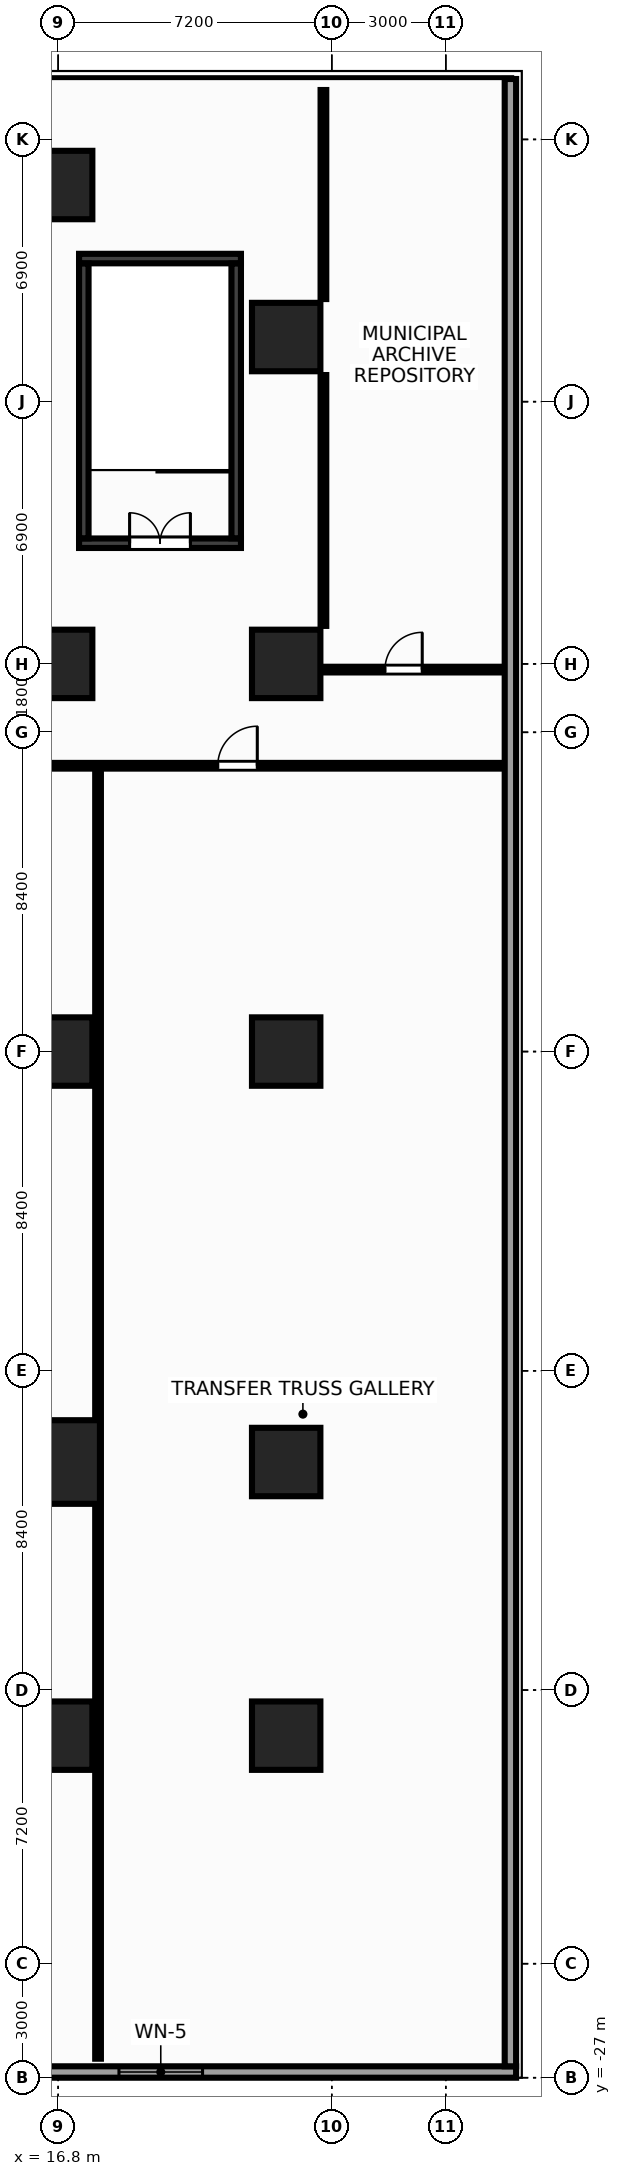
"""IFC4 building model, lengths in metres.
Left out: names, types, materials, properties, quantities, classifications, styles, units other than length and angle.
Written with IfcOpenShell. Run it as: python <this file> out.ifc"""

import sys

from ifc_helpers import new_model, si_unit, direction, frame, frame_2d, origin, origin_2d, place, context, subcontext, project, spatial, rectangle, extrude, source, transform, mapped, element, fill, save


model = new_model("IFC4")
c1 = context("Model", 3, precision=1e-05, world=origin(), true_north=direction((0.0, 1.0)))
c2 = subcontext(c1, "Body", "Model", "MODEL_VIEW")
j1 = project(units=[si_unit("LENGTHUNIT", "METRE"), si_unit("PLANEANGLEUNIT", "RADIAN")], contexts=[c1])
p1 = place(None, origin())
s1 = spatial("IfcSite", under=j1, at=p1, CompositionType="ELEMENT")
p2 = place(p1, origin())
s2 = spatial("IfcBuilding", under=s1, at=p2, CompositionType="ELEMENT")
p3 = place(p2, frame((0.0, 0.0, 18.95)))
s3 = spatial("IfcBuildingStorey", under=s2, at=p3, CompositionType="ELEMENT", Elevation=18.95)
m1 = source(origin(), c2, "Body", "SweptSolid", [
    extrude(rectangle(XDim=4.26, YDim=0.25, at=frame_2d((2.13, 0.0))), origin(), (0.0, 0.0, 1.0), 4.65),
])
p4 = place(p3, frame((17.35, 20.865, 0.0), z_axis=(0.0, 0.0, 1.0), x_axis=(1.0, 0.0, 0.0)))
e1 = element("IfcWall", 1, at=p4, inside=s3, PredefinedType="SHEAR", context=c2, shape_type="MappedRepresentation", body=[
    mapped(m1, transform((0.0, 0.0, 0.0), x_axis=(1.0, 0.0, 0.0), y_axis=(0.0, 1.0, 0.0), z_axis=(0.0, 0.0, 1.0), scale=1.0)),
])
p5 = place(p3, frame((17.35, 13.375, 0.0), z_axis=(0.0, 0.0, 1.0), x_axis=(1.0, 0.0, 0.0)))
e2 = element("IfcWall", 2, at=p5, inside=s3, PredefinedType="SHEAR", context=c2, shape_type="MappedRepresentation", body=[
    mapped(m1, transform((0.0, 0.0, 0.0), x_axis=(1.0, 0.0, 0.0), y_axis=(0.0, 1.0, 0.0), z_axis=(0.0, 0.0, 1.0), scale=1.0)),
])
p6 = place(p5, frame((1.33, 0.0, 0.0)))
e3 = element("IfcOpeningElement", 3, at=p6, cuts=e2, PredefinedType="OPENING", context=c2, shape_type="SweptSolid", body=[
    extrude(rectangle(XDim=1.6, YDim=2.15, at=frame_2d((0.8, 1.075))), frame((0.0, 0.137, 0.0), z_axis=(0.0, -1.0, 0.0), x_axis=(1.0, 0.0, 0.0)), (0.0, 0.0, 1.0), 0.274),
])
m2 = source(origin(), c2, "Body", "SweptSolid", [
    extrude(rectangle(XDim=7.23, YDim=0.25, at=frame_2d((3.615, 0.0))), origin(), (0.0, 0.0, 1.0), 4.65),
])
for number, where, z_axis, x_axis in (
    (4, (17.475, 13.505, 0.0), (0.0, 0.0, 1.0), (0.0, 1.0, 0.0)),
    (5, (21.485, 13.505, 0.0), (0.0, 0.0, 1.0), (0.0, 1.0, 0.0)),
):
    element("IfcWall", number, at=place(p3, frame(where, z_axis=z_axis, x_axis=x_axis)), inside=s3, PredefinedType="SHEAR", context=c2, shape_type="MappedRepresentation", body=[
        mapped(m2, transform((0.0, 0.0, 0.0), x_axis=(1.0, 0.0, 0.0), y_axis=(0.0, 1.0, 0.0), z_axis=(0.0, 0.0, 1.0), scale=1.0)),
    ])
m3 = source(origin(), c2, "Body", "SweptSolid", [
    extrude(rectangle(XDim=1.8, YDim=1.8, at=origin_2d()), origin(), (0.0, 0.0, 1.0), 4.65),
])
p7 = place(p3, frame((16.8, -18.0, 0.0), z_axis=(0.0, 0.0, 1.0), x_axis=(1.0, 0.0, 0.0)))
e6 = element("IfcColumn", 6, at=p7, inside=s3, PredefinedType="COLUMN", context=c2, shape_type="MappedRepresentation", body=[
    mapped(m3, transform((0.0, 0.0, 0.0), x_axis=(1.0, 0.0, 0.0), y_axis=(0.0, 1.0, 0.0), z_axis=(0.0, 0.0, 1.0), scale=1.0)),
])
m4 = source(origin(), c2, "Body", "SweptSolid", [
    extrude(rectangle(XDim=2.2, YDim=2.2, at=origin_2d()), origin(), (0.0, 0.0, 1.0), 4.65),
])
p8 = place(p3, frame((16.8, -10.8, 0.0), z_axis=(0.0, 0.0, 1.0), x_axis=(1.0, 0.0, 0.0)))
e7 = element("IfcColumn", 7, at=p8, inside=s3, PredefinedType="COLUMN", context=c2, shape_type="MappedRepresentation", body=[
    mapped(m4, transform((0.0, 0.0, 0.0), x_axis=(1.0, 0.0, 0.0), y_axis=(0.0, 1.0, 0.0), z_axis=(0.0, 0.0, 1.0), scale=1.0)),
])
for number, where, z_axis, x_axis in (
    (8, (16.8, 0.0, 0.0), (0.0, 0.0, 1.0), (1.0, 0.0, 0.0)),
    (9, (16.8, 10.2, 0.0), (0.0, 0.0, 1.0), (1.0, 0.0, 0.0)),
    (10, (16.8, 22.8, 0.0), (0.0, 0.0, 1.0), (1.0, 0.0, 0.0)),
    (11, (22.8, -18.0, 0.0), (0.0, 0.0, 1.0), (1.0, 0.0, 0.0)),
    (12, (22.8, -10.8, 0.0), (0.0, 0.0, 1.0), (1.0, 0.0, 0.0)),
    (13, (22.8, 0.0, 0.0), (0.0, 0.0, 1.0), (1.0, 0.0, 0.0)),
    (14, (22.8, 10.2, 0.0), (0.0, 0.0, 1.0), (1.0, 0.0, 0.0)),
    (15, (22.8, 18.8, 0.0), (0.0, 0.0, 1.0), (1.0, 0.0, 0.0)),
):
    element("IfcColumn", number, at=place(p3, frame(where, z_axis=z_axis, x_axis=x_axis)), inside=s3, PredefinedType="COLUMN", context=c2, shape_type="MappedRepresentation", body=[
        mapped(m3, transform((0.0, 0.0, 0.0), x_axis=(1.0, 0.0, 0.0), y_axis=(0.0, 1.0, 0.0), z_axis=(0.0, 0.0, 1.0), scale=1.0)),
    ])
m5 = source(origin(), c2, "Body", "SweptSolid", [
    extrude(rectangle(XDim=57.7, YDim=0.3, at=frame_2d((28.85, 0.0))), origin(), (0.0, 0.0, 1.0), 3.91),
])
p9 = place(p3, frame((28.85, -26.85, 0.0), z_axis=(0.0, 0.0, 1.0), x_axis=(-1.0, 0.0, 0.0)))
e16 = element("IfcWall", 16, at=p9, inside=s3, PredefinedType="STANDARD", context=c2, shape_type="MappedRepresentation", body=[
    mapped(m5, transform((0.0, 0.0, 0.0), x_axis=(1.0, 0.0, 0.0), y_axis=(0.0, 1.0, 0.0), z_axis=(0.0, 0.0, 1.0), scale=1.0)),
])
p10 = place(p9, frame((8.25, 0.0, 0.9)))
e17 = element("IfcOpeningElement", 17, at=p10, cuts=e16, PredefinedType="OPENING", context=c2, shape_type="SweptSolid", body=[
    extrude(rectangle(XDim=2.2, YDim=2.5, at=frame_2d((1.1, 1.25))), frame((0.0, 0.162, 0.0), z_axis=(0.0, -1.0, 0.0), x_axis=(1.0, 0.0, 0.0)), (0.0, 0.0, 1.0), 0.324),
])
p11 = place(p9, frame((14.75, 0.0, 0.9)))
e18 = element("IfcOpeningElement", 18, at=p11, cuts=e16, PredefinedType="OPENING", context=c2, shape_type="SweptSolid", body=[
    extrude(rectangle(XDim=2.2, YDim=2.5, at=frame_2d((1.1, 1.25))), frame((0.0, 0.162, 0.0), z_axis=(0.0, -1.0, 0.0), x_axis=(1.0, 0.0, 0.0)), (0.0, 0.0, 1.0), 0.324),
])
p12 = place(p9, frame((40.75, 0.0, 0.9)))
e19 = element("IfcOpeningElement", 19, at=p12, cuts=e16, PredefinedType="OPENING", context=c2, shape_type="SweptSolid", body=[
    extrude(rectangle(XDim=2.2, YDim=2.5, at=frame_2d((1.1, 1.25))), frame((0.0, 0.162, 0.0), z_axis=(0.0, -1.0, 0.0), x_axis=(1.0, 0.0, 0.0)), (0.0, 0.0, 1.0), 0.324),
])
p13 = place(p9, frame((47.25, 0.0, 0.9)))
e20 = element("IfcOpeningElement", 20, at=p13, cuts=e16, PredefinedType="OPENING", context=c2, shape_type="SweptSolid", body=[
    extrude(rectangle(XDim=2.2, YDim=2.5, at=frame_2d((1.1, 1.25))), frame((0.0, 0.162, 0.0), z_axis=(0.0, -1.0, 0.0), x_axis=(1.0, 0.0, 0.0)), (0.0, 0.0, 1.0), 0.324),
])
m6 = source(origin(), c2, "Body", "SweptSolid", [
    extrude(rectangle(XDim=52.29, YDim=0.3, at=frame_2d((26.145, 0.0))), origin(), (0.0, 0.0, 1.0), 3.91),
])
p14 = place(p3, frame((28.7, 25.59, 0.0), z_axis=(0.0, 0.0, 1.0), x_axis=(0.0, -1.0, 0.0)))
e21 = element("IfcWall", 21, at=p14, inside=s3, PredefinedType="STANDARD", context=c2, shape_type="MappedRepresentation", body=[
    mapped(m6, transform((0.0, 0.0, 0.0), x_axis=(1.0, 0.0, 0.0), y_axis=(0.0, 1.0, 0.0), z_axis=(0.0, 0.0, 1.0), scale=1.0)),
])
m7 = source(origin(), c2, "Body", "SweptSolid", [
    extrude(rectangle(XDim=57.0, YDim=0.15, at=frame_2d((28.5, 0.0))), origin(), (0.0, 0.0, 1.0), 3.795),
])
p15 = place(p3, frame((-28.5, 7.52, 0.0), z_axis=(0.0, 0.0, 1.0), x_axis=(1.0, 0.0, 0.0)))
e22 = element("IfcWall", 22, at=p15, inside=s3, PredefinedType="PARTITIONING", context=c2, shape_type="MappedRepresentation", body=[
    mapped(m7, transform((0.0, 0.0, 0.0), x_axis=(1.0, 0.0, 0.0), y_axis=(0.0, 1.0, 0.0), z_axis=(0.0, 0.0, 1.0), scale=1.0)),
])
p16 = place(p15, frame((6.0, 0.0, 0.0)))
e23 = element("IfcOpeningElement", 23, at=p16, cuts=e22, PredefinedType="OPENING", context=c2, shape_type="SweptSolid", body=[
    extrude(rectangle(XDim=1.04, YDim=2.2, at=frame_2d((0.52, 1.1))), frame((0.0, 0.087, 0.0), z_axis=(0.0, -1.0, 0.0), x_axis=(1.0, 0.0, 0.0)), (0.0, 0.0, 1.0), 0.174),
])
p17 = place(p15, frame((27.7, 0.0, 0.0)))
e24 = element("IfcOpeningElement", 24, at=p17, cuts=e22, PredefinedType="OPENING", context=c2, shape_type="SweptSolid", body=[
    extrude(rectangle(XDim=1.65, YDim=2.35, at=frame_2d((0.825, 1.175))), frame((0.0, 0.087, 0.0), z_axis=(0.0, -1.0, 0.0), x_axis=(1.0, 0.0, 0.0)), (0.0, 0.0, 1.0), 0.174),
])
p18 = place(p15, frame((49.5, 0.0, 0.0)))
e25 = element("IfcOpeningElement", 25, at=p18, cuts=e22, PredefinedType="OPENING", context=c2, shape_type="SweptSolid", body=[
    extrude(rectangle(XDim=1.04, YDim=2.2, at=frame_2d((0.52, 1.1))), frame((0.0, 0.087, 0.0), z_axis=(0.0, -1.0, 0.0), x_axis=(1.0, 0.0, 0.0)), (0.0, 0.0, 1.0), 0.174),
])
m8 = source(origin(), c2, "Body", "SweptSolid", [
    extrude(rectangle(XDim=4.7, YDim=0.15, at=frame_2d((2.35, 0.0))), origin(), (0.0, 0.0, 1.0), 3.485),
])
p19 = place(p3, frame((23.8, 10.05, 0.0), z_axis=(0.0, 0.0, 1.0), x_axis=(1.0, 0.0, 0.0)))
e26 = element("IfcWall", 26, at=p19, inside=s3, PredefinedType="PARTITIONING", context=c2, shape_type="MappedRepresentation", body=[
    mapped(m8, transform((0.0, 0.0, 0.0), x_axis=(1.0, 0.0, 0.0), y_axis=(0.0, 1.0, 0.0), z_axis=(0.0, 0.0, 1.0), scale=1.0)),
])
p20 = place(p19, frame((1.6, 0.0, 0.0)))
e27 = element("IfcOpeningElement", 27, at=p20, cuts=e26, PredefinedType="OPENING", context=c2, shape_type="SweptSolid", body=[
    extrude(rectangle(XDim=0.98, YDim=2.15, at=frame_2d((0.49, 1.075))), frame((0.0, 0.087, 0.0), z_axis=(0.0, -1.0, 0.0), x_axis=(1.0, 0.0, 0.0)), (0.0, 0.0, 1.0), 0.174),
])
m9 = source(origin(), c2, "Body", "SweptSolid", [
    extrude(rectangle(XDim=6.6, YDim=0.15, at=frame_2d((3.3, 0.0))), origin(), (0.0, 0.0, 1.0), 4.41),
])
p21 = place(p3, frame((23.78, 11.2, 0.0), z_axis=(0.0, 0.0, 1.0), x_axis=(0.0, 1.0, 0.0)))
e28 = element("IfcWall", 28, at=p21, inside=s3, PredefinedType="PARTITIONING", context=c2, shape_type="MappedRepresentation", body=[
    mapped(m9, transform((0.0, 0.0, 0.0), x_axis=(1.0, 0.0, 0.0), y_axis=(0.0, 1.0, 0.0), z_axis=(0.0, 0.0, 1.0), scale=1.0)),
])
m10 = source(origin(), c2, "Body", "SweptSolid", [
    extrude(rectangle(XDim=5.5, YDim=0.15, at=frame_2d((2.75, 0.0))), origin(), (0.0, 0.0, 1.0), 4.41),
])
p22 = place(p3, frame((23.78, 19.8, 0.0), z_axis=(0.0, 0.0, 1.0), x_axis=(0.0, 1.0, 0.0)))
e29 = element("IfcWall", 29, at=p22, inside=s3, PredefinedType="PARTITIONING", context=c2, shape_type="MappedRepresentation", body=[
    mapped(m10, transform((0.0, 0.0, 0.0), x_axis=(1.0, 0.0, 0.0), y_axis=(0.0, 1.0, 0.0), z_axis=(0.0, 0.0, 1.0), scale=1.0)),
])
m11 = source(origin(), c2, "Body", "SweptSolid", [
    extrude(rectangle(XDim=33.88, YDim=0.15, at=frame_2d((16.94, 0.0))), origin(), (0.0, 0.0, 1.0), 3.795),
])
p23 = place(p3, frame((17.85, -26.5, 0.0), z_axis=(0.0, 0.0, 1.0), x_axis=(0.0, 1.0, 0.0)))
e30 = element("IfcWall", 30, at=p23, inside=s3, PredefinedType="PARTITIONING", context=c2, shape_type="MappedRepresentation", body=[
    mapped(m11, transform((0.0, 0.0, 0.0), x_axis=(1.0, 0.0, 0.0), y_axis=(0.0, 1.0, 0.0), z_axis=(0.0, 0.0, 1.0), scale=1.0)),
])
m12 = source(origin(), c2, "Body", "SweptSolid", [
    extrude(rectangle(XDim=2.2, YDim=2.5, at=frame_2d((1.1, 1.25))), frame((0.0, 0.03, 0.0), z_axis=(0.0, -1.0, 0.0), x_axis=(1.0, 0.0, 0.0)), (0.0, 0.0, 1.0), 0.06),
])
p24 = place(p10, origin())
e31 = element("IfcWindow", 31, at=p24, inside=s3, PartitioningType="SINGLE_PANEL", PredefinedType="WINDOW", context=c2, shape_type="MappedRepresentation", body=[
    mapped(m12, transform((0.0, 0.0, 0.0), x_axis=(1.0, 0.0, 0.0), y_axis=(0.0, 1.0, 0.0), z_axis=(0.0, 0.0, 1.0), scale=1.0)),
])
fill(e17, e31)
m13 = source(origin(), c2, "Body", "SweptSolid", [
    extrude(rectangle(XDim=1.6, YDim=2.15, at=frame_2d((0.8, 1.075))), frame((0.0, 0.025, 0.0), z_axis=(0.0, -1.0, 0.0), x_axis=(1.0, 0.0, 0.0)), (0.0, 0.0, 1.0), 0.05),
])
p25 = place(p6, origin())
e32 = element("IfcDoor", 32, at=p25, inside=s3, OperationType="DOUBLE_DOOR_SINGLE_SWING", PredefinedType="DOOR", context=c2, shape_type="MappedRepresentation", body=[
    mapped(m13, transform((0.0, 0.0, 0.0), x_axis=(1.0, 0.0, 0.0), y_axis=(0.0, 1.0, 0.0), z_axis=(0.0, 0.0, 1.0), scale=1.0)),
])
fill(e3, e32)
m14 = source(origin(), c2, "Body", "SweptSolid", [
    extrude(rectangle(XDim=1.04, YDim=2.2, at=frame_2d((0.52, 1.1))), frame((0.0, 0.025, 0.0), z_axis=(0.0, -1.0, 0.0), x_axis=(1.0, 0.0, 0.0)), (0.0, 0.0, 1.0), 0.05),
])
p26 = place(p18, origin())
e33 = element("IfcDoor", 33, at=p26, inside=s3, OperationType="SINGLE_SWING_RIGHT", PredefinedType="DOOR", context=c2, shape_type="MappedRepresentation", body=[
    mapped(m14, transform((0.0, 0.0, 0.0), x_axis=(1.0, 0.0, 0.0), y_axis=(0.0, 1.0, 0.0), z_axis=(0.0, 0.0, 1.0), scale=1.0)),
])
fill(e25, e33)
m15 = source(origin(), c2, "Body", "SweptSolid", [
    extrude(rectangle(XDim=0.98, YDim=2.15, at=frame_2d((0.49, 1.075))), frame((0.0, 0.025, 0.0), z_axis=(0.0, -1.0, 0.0), x_axis=(1.0, 0.0, 0.0)), (0.0, 0.0, 1.0), 0.05),
])
p27 = place(p20, origin())
e34 = element("IfcDoor", 34, at=p27, inside=s3, OperationType="SINGLE_SWING_RIGHT", PredefinedType="DOOR", context=c2, shape_type="MappedRepresentation", body=[
    mapped(m15, transform((0.0, 0.0, 0.0), x_axis=(1.0, 0.0, 0.0), y_axis=(0.0, 1.0, 0.0), z_axis=(0.0, 0.0, 1.0), scale=1.0)),
])
fill(e27, e34)
save(model, sys.argv[1])
